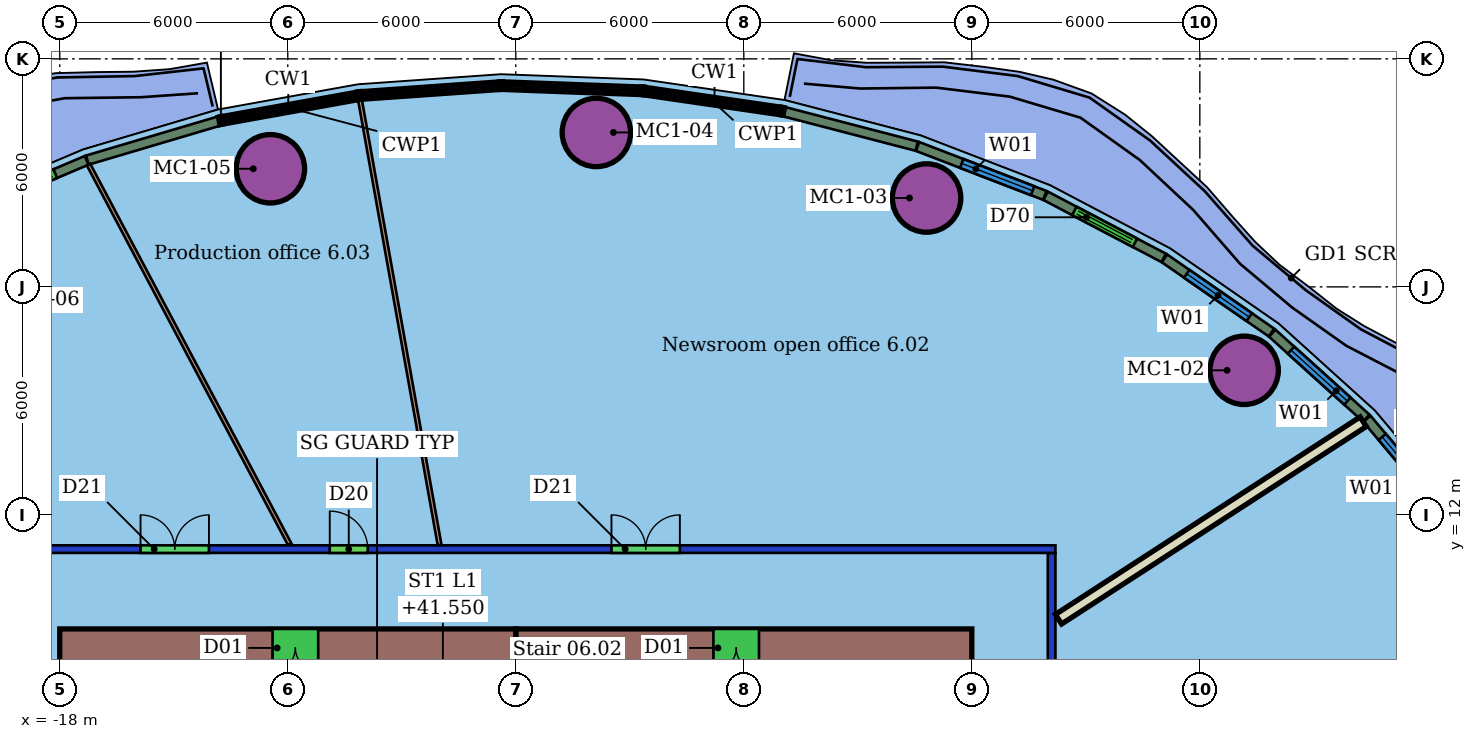
"""IFC4 building model, lengths in metres.
Left out: names, types, materials, properties, quantities, classifications, styles, units other than length and angle.
Written with IfcOpenShell. Run it as: python <this file> out.ifc"""

import sys

from ifc_helpers import new_model, si_unit, direction, frame, frame_2d, origin, origin_2d, place, context, subcontext, project, spatial, rectangle, hollow_circle, extrude, element, fill, save


model = new_model("IFC4")
c1 = context("Model", 3, precision=1e-05, world=origin(), true_north=direction((0.0, 1.0)))
c2 = subcontext(c1, "Body", "Model", "MODEL_VIEW")
j1 = project(units=[si_unit("LENGTHUNIT", "METRE"), si_unit("PLANEANGLEUNIT", "RADIAN")], contexts=[c1])
p1 = place(None, origin())
s1 = spatial("IfcSite", under=j1, at=p1, CompositionType="ELEMENT")
p2 = place(p1, origin())
s2 = spatial("IfcBuilding", under=s1, at=p2, CompositionType="ELEMENT")
p3 = place(p2, frame((0.0, 0.0, 39.7)))
s3 = spatial("IfcBuildingStorey", under=s2, at=p3, CompositionType="ELEMENT", Elevation=39.7)
for number, where, z_axis, x_axis in (
    (1, (13.166, 15.805, 0.0), (0.0, 0.0, 1.0), (1.0, 0.0, 0.0)),
    (2, (4.81, 20.339, 0.0), (0.0, 0.0, 1.0), (1.0, 0.0, 0.0)),
    (3, (-3.879, 22.064, 0.0), (0.0, 0.0, 1.0), (1.0, 0.0, 0.0)),
    (4, (-12.458, 21.108, 0.0), (0.0, 0.0, 1.0), (1.0, 0.0, 0.0)),
):
    element("IfcColumn", number, at=place(p3, frame(where, z_axis=z_axis, x_axis=x_axis)), inside=s3, PredefinedType="COLUMN", context=c2, shape_type="SweptSolid", body=[
        extrude(hollow_circle(Radius=0.9, WallThickness=0.06, at=origin_2d()), origin(), (0.0, 0.0, 1.0), 3.55),
    ])
p4 = place(p3, frame((-20.2, 11.1, 0.0), z_axis=(0.0, 0.0, 1.0), x_axis=(1.0, 0.0, 0.0)))
e5 = element("IfcWall", 5, at=p4, inside=s3, PredefinedType="PARTITIONING", context=c2, shape_type="SweptSolid", body=[
    extrude(rectangle(XDim=28.4, YDim=0.2, at=frame_2d((14.2, 0.0))), origin(), (0.0, 0.0, 1.0), 2.85),
])
p5 = place(p4, frame((16.718, 0.0, 0.0)))
e6 = element("IfcOpeningElement", 6, at=p5, cuts=e5, PredefinedType="OPENING", context=c2, shape_type="SweptSolid", body=[
    extrude(rectangle(XDim=1.8, YDim=2.1, at=frame_2d((0.9, 1.05))), frame((0.0, 0.11, 0.0), z_axis=(0.0, -1.0, 0.0), x_axis=(1.0, 0.0, 0.0)), (0.0, 0.0, 1.0), 0.22),
])
p6 = place(p4, frame((9.305, 0.0, 0.0)))
e7 = element("IfcOpeningElement", 7, at=p6, cuts=e5, PredefinedType="OPENING", context=c2, shape_type="SweptSolid", body=[
    extrude(rectangle(XDim=1.0, YDim=2.1, at=frame_2d((0.5, 1.05))), frame((0.0, 0.11, 0.0), z_axis=(0.0, -1.0, 0.0), x_axis=(1.0, 0.0, 0.0)), (0.0, 0.0, 1.0), 0.22),
])
p7 = place(p4, frame((4.326, 0.0, 0.0)))
e8 = element("IfcOpeningElement", 8, at=p7, cuts=e5, PredefinedType="OPENING", context=c2, shape_type="SweptSolid", body=[
    extrude(rectangle(XDim=1.8, YDim=2.1, at=frame_2d((0.9, 1.05))), frame((0.0, 0.11, 0.0), z_axis=(0.0, -1.0, 0.0), x_axis=(1.0, 0.0, 0.0)), (0.0, 0.0, 1.0), 0.22),
])
p8 = place(p3, frame((8.1, 11.0, 0.0), z_axis=(0.0, 0.0, 1.0), x_axis=(0.0, -1.0, 0.0)))
e9 = element("IfcWall", 9, at=p8, inside=s3, PredefinedType="PARTITIONING", context=c2, shape_type="SweptSolid", body=[
    extrude(rectangle(XDim=22.0, YDim=0.2, at=frame_2d((11.0, 0.0))), origin(), (0.0, 0.0, 1.0), 2.85),
])
p9 = place(p8, frame((6.036, 0.0, 0.0)))
e10 = element("IfcOpeningElement", 10, at=p9, cuts=e9, PredefinedType="OPENING", context=c2, shape_type="SweptSolid", body=[
    extrude(rectangle(XDim=1.1, YDim=2.1, at=frame_2d((0.55, 1.05))), frame((0.0, 0.11, 0.0), z_axis=(0.0, -1.0, 0.0), x_axis=(1.0, 0.0, 0.0)), (0.0, 0.0, 1.0), 0.22),
])
p10 = place(p8, frame((12.807, 0.0, 0.0)))
e11 = element("IfcOpeningElement", 11, at=p10, cuts=e9, PredefinedType="OPENING", context=c2, shape_type="SweptSolid", body=[
    extrude(rectangle(XDim=0.9, YDim=2.1, at=frame_2d((0.45, 1.05))), frame((0.0, 0.11, 0.0), z_axis=(0.0, -1.0, 0.0), x_axis=(1.0, 0.0, 0.0)), (0.0, 0.0, 1.0), 0.22),
])
p11 = place(p3, frame((16.299, 14.452, 0.0), z_axis=(0.0, 0.0, 1.0), x_axis=(-0.839170912844, -0.54386779555, 0.0)))
e12 = element("IfcWall", 12, at=p11, inside=s3, PredefinedType="PARTITIONING", context=c2, shape_type="SweptSolid", body=[
    extrude(rectangle(XDim=9.554, YDim=0.3, at=frame_2d((4.777, 0.0))), origin(), (0.0, 0.0, 1.0), 3.55),
])
p12 = place(p3, frame((-10.098, 22.91, 0.0), z_axis=(0.0, 0.0, 1.0), x_axis=(0.176081376596, -0.984375613684, 0.0)))
e13 = element("IfcWall", 13, at=p12, inside=s3, PredefinedType="PARTITIONING", context=c2, shape_type="SweptSolid", body=[
    extrude(rectangle(XDim=11.887, YDim=0.1, at=frame_2d((5.943, 0.0))), origin(), (0.0, 0.0, 1.0), 3.55),
])
p13 = place(p3, frame((-17.241, 21.215, 0.0), z_axis=(0.0, 0.0, 1.0), x_axis=(0.468204132098, -0.883620331752, 0.0)))
e14 = element("IfcWall", 14, at=p13, inside=s3, PredefinedType="PARTITIONING", context=c2, shape_type="SweptSolid", body=[
    extrude(rectangle(XDim=11.308, YDim=0.1, at=frame_2d((5.654, 0.0))), origin(), (0.0, 0.0, 1.0), 3.55),
])
p14 = place(p3, frame((18.489, 12.049, 0.0), z_axis=(0.0, 0.0, 1.0), x_axis=(-0.644879179912, 0.76428453034, 0.0)))
e15 = element("IfcWall", 15, at=p14, inside=s3, PredefinedType="SOLIDWALL", context=c2, shape_type="SweptSolid", body=[
    extrude(rectangle(XDim=3.245, YDim=0.25, at=frame_2d((1.623, 0.0))), origin(), (0.0, 0.0, 1.0), 3.15),
])
p15 = place(p14, frame((0.622, 0.0, 0.8)))
e16 = element("IfcOpeningElement", 16, at=p15, cuts=e15, PredefinedType="OPENING", context=c2, shape_type="SweptSolid", body=[
    extrude(rectangle(XDim=2.0, YDim=2.2, at=frame_2d((1.0, 1.1))), frame((0.0, 0.135, 0.0), z_axis=(0.0, -1.0, 0.0), x_axis=(1.0, 0.0, 0.0)), (0.0, 0.0, 1.0), 0.27),
])
p16 = place(p3, frame((16.379, 14.547, 0.0), z_axis=(0.0, 0.0, 1.0), x_axis=(-0.741993404353, 0.670407180672, 0.0)))
e17 = element("IfcWall", 17, at=p16, inside=s3, PredefinedType="SOLIDWALL", context=c2, shape_type="SweptSolid", body=[
    extrude(rectangle(XDim=3.335, YDim=0.25, at=frame_2d((1.668, 0.0))), origin(), (0.0, 0.0, 1.0), 3.15),
])
p17 = place(p16, frame((0.668, 0.0, 0.8)))
e18 = element("IfcOpeningElement", 18, at=p17, cuts=e17, PredefinedType="OPENING", context=c2, shape_type="SweptSolid", body=[
    extrude(rectangle(XDim=2.0, YDim=2.2, at=frame_2d((1.0, 1.1))), frame((0.0, 0.135, 0.0), z_axis=(0.0, -1.0, 0.0), x_axis=(1.0, 0.0, 0.0)), (0.0, 0.0, 1.0), 0.27),
])
p18 = place(p3, frame((13.886, 16.798, 0.0), z_axis=(0.0, 0.0, 1.0), x_axis=(-0.821704553171, 0.569913701623, 0.0)))
e19 = element("IfcWall", 19, at=p18, inside=s3, PredefinedType="SOLIDWALL", context=c2, shape_type="SweptSolid", body=[
    extrude(rectangle(XDim=3.427, YDim=0.25, at=frame_2d((1.713, 0.0))), origin(), (0.0, 0.0, 1.0), 3.15),
])
p19 = place(p18, frame((0.713, 0.0, 0.8)))
e20 = element("IfcOpeningElement", 20, at=p19, cuts=e19, PredefinedType="OPENING", context=c2, shape_type="SweptSolid", body=[
    extrude(rectangle(XDim=2.0, YDim=2.2, at=frame_2d((1.0, 1.1))), frame((0.0, 0.135, 0.0), z_axis=(0.0, -1.0, 0.0), x_axis=(1.0, 0.0, 0.0)), (0.0, 0.0, 1.0), 0.27),
])
p20 = place(p3, frame((11.05, 18.763, 0.0), z_axis=(0.0, 0.0, 1.0), x_axis=(-0.885034300513, 0.465525817667, 0.0)))
e21 = element("IfcWall", 21, at=p20, inside=s3, PredefinedType="SOLIDWALL", context=c2, shape_type="SweptSolid", body=[
    extrude(rectangle(XDim=3.512, YDim=0.25, at=frame_2d((1.756, 0.0))), origin(), (0.0, 0.0, 1.0), 3.15),
])
p21 = place(p20, frame((0.856, 0.0, 0.0)))
e22 = element("IfcOpeningElement", 22, at=p21, cuts=e21, PredefinedType="OPENING", context=c2, shape_type="SweptSolid", body=[
    extrude(rectangle(XDim=1.8, YDim=2.4, at=frame_2d((0.9, 1.2))), frame((0.0, 0.135, 0.0), z_axis=(0.0, -1.0, 0.0), x_axis=(1.0, 0.0, 0.0)), (0.0, 0.0, 1.0), 0.27),
])
p22 = place(p3, frame((7.921, 20.407, 0.0), z_axis=(0.0, 0.0, 1.0), x_axis=(-0.933305255529, 0.359083973468, 0.0)))
e23 = element("IfcWall", 23, at=p22, inside=s3, PredefinedType="SOLIDWALL", context=c2, shape_type="SweptSolid", body=[
    extrude(rectangle(XDim=3.587, YDim=0.25, at=frame_2d((1.793, 0.0))), origin(), (0.0, 0.0, 1.0), 3.15),
])
p23 = place(p22, frame((0.344, 0.0, 0.8)))
e24 = element("IfcOpeningElement", 24, at=p23, cuts=e23, PredefinedType="OPENING", context=c2, shape_type="SweptSolid", body=[
    extrude(rectangle(XDim=2.0, YDim=2.2, at=frame_2d((1.0, 1.1))), frame((0.0, 0.135, 0.0), z_axis=(0.0, -1.0, 0.0), x_axis=(1.0, 0.0, 0.0)), (0.0, 0.0, 1.0), 0.27),
])
p24 = place(p3, frame((4.552, 21.702, 0.0), z_axis=(0.0, 0.0, 1.0), x_axis=(-0.967782560997, 0.25178743938, 0.0)))
e25 = element("IfcWall", 25, at=p24, inside=s3, PredefinedType="SOLIDWALL", context=c2, shape_type="SweptSolid", body=[
    extrude(rectangle(XDim=3.603, YDim=0.25, at=frame_2d((1.802, 0.0))), origin(), (0.0, 0.0, 1.0), 3.15),
])
p25 = place(p3, frame((-13.818, 22.36, 0.0), z_axis=(0.0, 0.0, 1.0), x_axis=(-0.958796062101, -0.284095250399, 0.0)))
e26 = element("IfcWall", 26, at=p25, inside=s3, PredefinedType="SOLIDWALL", context=c2, shape_type="SweptSolid", body=[
    extrude(rectangle(XDim=3.603, YDim=0.25, at=frame_2d((1.802, 0.0))), origin(), (0.0, 0.0, 1.0), 3.15),
])
p26 = place(p3, frame((-17.294, 21.329, 0.0), z_axis=(0.0, 0.0, 1.0), x_axis=(-0.920777409004, -0.390088404169, 0.0)))
e27 = element("IfcWall", 27, at=p26, inside=s3, PredefinedType="SOLIDWALL", context=c2, shape_type="SweptSolid", body=[
    extrude(rectangle(XDim=3.587, YDim=0.25, at=frame_2d((1.794, 0.0))), origin(), (0.0, 0.0, 1.0), 3.15),
])
p27 = place(p26, frame((0.894, 0.0, 0.0)))
e28 = element("IfcOpeningElement", 28, at=p27, cuts=e27, PredefinedType="OPENING", context=c2, shape_type="SweptSolid", body=[
    extrude(rectangle(XDim=1.8, YDim=2.4, at=frame_2d((0.9, 1.2))), frame((0.0, 0.135, 0.0), z_axis=(0.0, -1.0, 0.0), x_axis=(1.0, 0.0, 0.0)), (0.0, 0.0, 1.0), 0.27),
])
p28 = place(p3, frame((6.0, 8.5, 0.0), z_axis=(0.0, 0.0, 1.0), x_axis=(-1.0, 0.0, 0.0)))
e29 = element("IfcWall", 29, at=p28, inside=s3, PredefinedType="SHEAR", context=c2, shape_type="SweptSolid", body=[
    extrude(rectangle(XDim=12.0, YDim=1.0, at=frame_2d((6.0, 0.0))), origin(), (0.0, 0.0, 1.0), 3.4),
])
p29 = place(p28, frame((5.6, 0.0, 0.0)))
e30 = element("IfcOpeningElement", 30, at=p29, cuts=e29, PredefinedType="OPENING", context=c2, shape_type="SweptSolid", body=[
    extrude(rectangle(XDim=1.2, YDim=2.1, at=frame_2d((0.6, 1.05))), frame((0.0, 0.51, 0.0), z_axis=(0.0, -1.0, 0.0), x_axis=(1.0, 0.0, 0.0)), (0.0, 0.0, 1.0), 1.02),
])
p30 = place(p3, frame((-6.0, 8.5, 0.0), z_axis=(0.0, 0.0, 1.0), x_axis=(-1.0, 0.0, 0.0)))
e31 = element("IfcWall", 31, at=p30, inside=s3, PredefinedType="SHEAR", context=c2, shape_type="SweptSolid", body=[
    extrude(rectangle(XDim=12.0, YDim=1.0, at=frame_2d((6.0, 0.0))), origin(), (0.0, 0.0, 1.0), 3.4),
])
p31 = place(p30, frame((5.2, 0.0, 0.0)))
e32 = element("IfcOpeningElement", 32, at=p31, cuts=e31, PredefinedType="OPENING", context=c2, shape_type="SweptSolid", body=[
    extrude(rectangle(XDim=1.2, YDim=2.1, at=frame_2d((0.6, 1.05))), frame((0.0, 0.51, 0.0), z_axis=(0.0, -1.0, 0.0), x_axis=(1.0, 0.0, 0.0)), (0.0, 0.0, 1.0), 1.02),
])
p32 = place(p5, origin())
e33 = element("IfcDoor", 33, at=p32, inside=s3, OperationType="DOUBLE_DOOR_SINGLE_SWING", PredefinedType="DOOR", context=c2, shape_type="SweptSolid", body=[
    extrude(rectangle(XDim=1.8, YDim=2.1, at=frame_2d((0.9, 1.05))), frame((0.0, 0.025, 0.0), z_axis=(0.0, -1.0, 0.0), x_axis=(1.0, 0.0, 0.0)), (0.0, 0.0, 1.0), 0.05),
])
fill(e6, e33)
p33 = place(p6, origin())
e34 = element("IfcDoor", 34, at=p33, inside=s3, OperationType="SINGLE_SWING_LEFT", PredefinedType="DOOR", context=c2, shape_type="SweptSolid", body=[
    extrude(rectangle(XDim=1.0, YDim=2.1, at=frame_2d((0.5, 1.05))), frame((0.0, 0.025, 0.0), z_axis=(0.0, -1.0, 0.0), x_axis=(1.0, 0.0, 0.0)), (0.0, 0.0, 1.0), 0.05),
])
fill(e7, e34)
p34 = place(p7, origin())
e35 = element("IfcDoor", 35, at=p34, inside=s3, OperationType="DOUBLE_DOOR_SINGLE_SWING", PredefinedType="DOOR", context=c2, shape_type="SweptSolid", body=[
    extrude(rectangle(XDim=1.8, YDim=2.1, at=frame_2d((0.9, 1.05))), frame((0.0, 0.025, 0.0), z_axis=(0.0, -1.0, 0.0), x_axis=(1.0, 0.0, 0.0)), (0.0, 0.0, 1.0), 0.05),
])
fill(e8, e35)
p35 = place(p15, origin())
e36 = element("IfcWindow", 36, at=p35, inside=s3, PartitioningType="SINGLE_PANEL", PredefinedType="WINDOW", context=c2, shape_type="SweptSolid", body=[
    extrude(rectangle(XDim=2.0, YDim=2.2, at=frame_2d((1.0, 1.1))), frame((0.0, 0.03, 0.0), z_axis=(0.0, -1.0, 0.0), x_axis=(1.0, 0.0, 0.0)), (0.0, 0.0, 1.0), 0.06),
])
fill(e16, e36)
p36 = place(p17, origin())
e37 = element("IfcWindow", 37, at=p36, inside=s3, PartitioningType="SINGLE_PANEL", PredefinedType="WINDOW", context=c2, shape_type="SweptSolid", body=[
    extrude(rectangle(XDim=2.0, YDim=2.2, at=frame_2d((1.0, 1.1))), frame((0.0, 0.03, 0.0), z_axis=(0.0, -1.0, 0.0), x_axis=(1.0, 0.0, 0.0)), (0.0, 0.0, 1.0), 0.06),
])
fill(e18, e37)
p37 = place(p19, origin())
e38 = element("IfcWindow", 38, at=p37, inside=s3, PartitioningType="SINGLE_PANEL", PredefinedType="WINDOW", context=c2, shape_type="SweptSolid", body=[
    extrude(rectangle(XDim=2.0, YDim=2.2, at=frame_2d((1.0, 1.1))), frame((0.0, 0.03, 0.0), z_axis=(0.0, -1.0, 0.0), x_axis=(1.0, 0.0, 0.0)), (0.0, 0.0, 1.0), 0.06),
])
fill(e20, e38)
p38 = place(p21, origin())
e39 = element("IfcDoor", 39, at=p38, inside=s3, OperationType="DOUBLE_DOOR_SLIDING", PredefinedType="DOOR", context=c2, shape_type="SweptSolid", body=[
    extrude(rectangle(XDim=1.8, YDim=2.4, at=frame_2d((0.9, 1.2))), frame((0.0, 0.025, 0.0), z_axis=(0.0, -1.0, 0.0), x_axis=(1.0, 0.0, 0.0)), (0.0, 0.0, 1.0), 0.05),
])
fill(e22, e39)
p39 = place(p23, origin())
e40 = element("IfcWindow", 40, at=p39, inside=s3, PartitioningType="SINGLE_PANEL", PredefinedType="WINDOW", context=c2, shape_type="SweptSolid", body=[
    extrude(rectangle(XDim=2.0, YDim=2.2, at=frame_2d((1.0, 1.1))), frame((0.0, 0.03, 0.0), z_axis=(0.0, -1.0, 0.0), x_axis=(1.0, 0.0, 0.0)), (0.0, 0.0, 1.0), 0.06),
])
fill(e24, e40)
p40 = place(p27, origin())
e41 = element("IfcDoor", 41, at=p40, inside=s3, OperationType="DOUBLE_DOOR_SLIDING", PredefinedType="DOOR", context=c2, shape_type="SweptSolid", body=[
    extrude(rectangle(XDim=1.8, YDim=2.4, at=frame_2d((0.9, 1.2))), frame((0.0, 0.025, 0.0), z_axis=(0.0, -1.0, 0.0), x_axis=(1.0, 0.0, 0.0)), (0.0, 0.0, 1.0), 0.05),
])
fill(e28, e41)
p41 = place(p29, origin())
e42 = element("IfcDoor", 42, at=p41, inside=s3, OperationType="DOUBLE_DOOR_SINGLE_SWING", PredefinedType="NOTDEFINED", context=c2, shape_type="SweptSolid", body=[
    extrude(rectangle(XDim=1.2, YDim=2.1, at=frame_2d((0.6, 1.05))), frame((0.0, 0.025, 0.0), z_axis=(0.0, -1.0, 0.0), x_axis=(1.0, 0.0, 0.0)), (0.0, 0.0, 1.0), 0.05),
])
fill(e30, e42)
p42 = place(p31, origin())
e43 = element("IfcDoor", 43, at=p42, inside=s3, OperationType="DOUBLE_DOOR_SINGLE_SWING", PredefinedType="NOTDEFINED", context=c2, shape_type="SweptSolid", body=[
    extrude(rectangle(XDim=1.2, YDim=2.1, at=frame_2d((0.6, 1.05))), frame((0.0, 0.025, 0.0), z_axis=(0.0, -1.0, 0.0), x_axis=(1.0, 0.0, 0.0)), (0.0, 0.0, 1.0), 0.05),
])
fill(e32, e43)
save(model, sys.argv[1])
